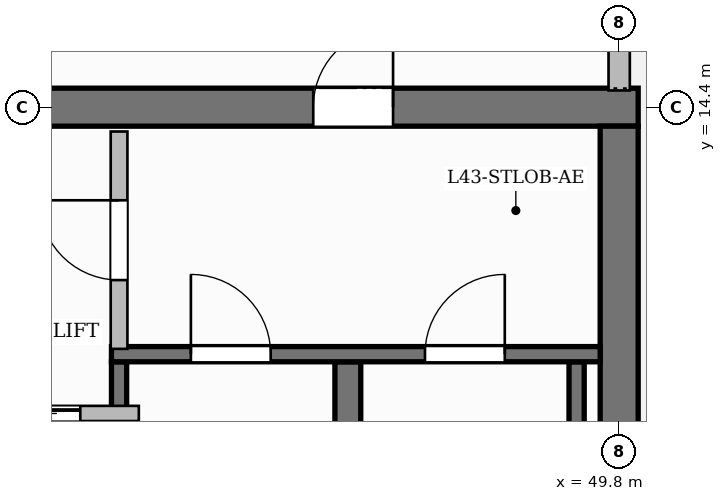
"""IFC4 building model, lengths in metres.
Left out: names, types, materials, properties, quantities, classifications, styles, units other than length and angle.
Written with IfcOpenShell. Run it as: python <this file> out.ifc"""

import sys

from ifc_helpers import new_model, si_unit, direction, frame, frame_2d, origin, place, context, subcontext, project, spatial, rectangle, extrude, source, transform, mapped, element, fill, save


model = new_model("IFC4")
c1 = context("Model", 3, precision=1e-05, world=origin(), true_north=direction((0.0, 1.0)))
c2 = subcontext(c1, "Body", "Model", "MODEL_VIEW")
j1 = project(units=[si_unit("LENGTHUNIT", "METRE"), si_unit("PLANEANGLEUNIT", "RADIAN")], contexts=[c1])
p1 = place(None, origin())
s1 = spatial("IfcSite", under=j1, at=p1, CompositionType="ELEMENT")
p2 = place(p1, origin())
s2 = spatial("IfcBuilding", under=s1, at=p2, CompositionType="ELEMENT")
p3 = place(p2, frame((0.0, 0.0, 173.4)))
s3 = spatial("IfcBuildingStorey", under=s2, at=p3, CompositionType="ELEMENT", Elevation=173.4)
p4 = place(p3, frame((34.55, 14.4, 0.0), z_axis=(0.0, 0.0, 1.0), x_axis=(1.0, 0.0, 0.0)))
e1 = element("IfcWall", 1, at=p4, inside=s3, PredefinedType="SHEAR", context=c2, shape_type="SweptSolid", body=[
    extrude(rectangle(XDim=15.5, YDim=0.5, at=frame_2d((7.75, 0.0))), origin(), (0.0, 0.0, 1.0), 3.85),
])
p5 = place(p4, frame((5.38, 0.0, 0.0)))
e2 = element("IfcOpeningElement", 2, at=p5, cuts=e1, PredefinedType="OPENING", context=c2, shape_type="SweptSolid", body=[
    extrude(rectangle(XDim=1.5, YDim=2.2, at=frame_2d((0.75, 1.1))), frame((0.0, 0.26, 0.0), z_axis=(0.0, -1.0, 0.0), x_axis=(1.0, 0.0, 0.0)), (0.0, 0.0, 1.0), 0.52),
])
p6 = place(p4, frame((1.595, 0.0, 0.0)))
e3 = element("IfcOpeningElement", 3, at=p6, cuts=e1, PredefinedType="OPENING", context=c2, shape_type="SweptSolid", body=[
    extrude(rectangle(XDim=1.05, YDim=2.15, at=frame_2d((0.525, 1.075))), frame((0.0, 0.26, 0.0), z_axis=(0.0, -1.0, 0.0), x_axis=(1.0, 0.0, 0.0)), (0.0, 0.0, 1.0), 0.52),
])
p7 = place(p4, frame((11.225, 0.0, 0.0)))
e4 = element("IfcOpeningElement", 4, at=p7, cuts=e1, PredefinedType="OPENING", context=c2, shape_type="SweptSolid", body=[
    extrude(rectangle(XDim=1.05, YDim=2.15, at=frame_2d((0.525, 1.075))), frame((0.0, 0.26, 0.0), z_axis=(0.0, -1.0, 0.0), x_axis=(1.0, 0.0, 0.0)), (0.0, 0.0, 1.0), 0.52),
])
p8 = place(p3, frame((49.8, 3.85, 0.0), z_axis=(0.0, 0.0, 1.0), x_axis=(0.0, 1.0, 0.0)))
e5 = element("IfcWall", 5, at=p8, inside=s3, PredefinedType="SHEAR", context=c2, shape_type="SweptSolid", body=[
    extrude(rectangle(XDim=10.3, YDim=0.5, at=frame_2d((5.15, 0.0))), origin(), (0.0, 0.0, 1.0), 3.85),
])
p9 = place(p3, frame((43.22, 4.1, 0.0), z_axis=(0.0, 0.0, 1.0), x_axis=(0.0, 1.0, 0.0)))
e6 = element("IfcWall", 6, at=p9, inside=s3, PredefinedType="SHEAR", context=c2, shape_type="SweptSolid", body=[
    extrude(rectangle(XDim=6.95, YDim=0.2, at=frame_2d((3.475, 0.0))), origin(), (0.0, 0.0, 1.0), 3.85),
])
p10 = place(p3, frame((46.23, 4.1, 0.0), z_axis=(0.0, 0.0, 1.0), x_axis=(0.0, 1.0, 0.0)))
e7 = element("IfcWall", 7, at=p10, inside=s3, PredefinedType="SHEAR", context=c2, shape_type="SweptSolid", body=[
    extrude(rectangle(XDim=6.95, YDim=0.34, at=frame_2d((3.475, 0.0))), origin(), (0.0, 0.0, 1.0), 3.85),
])
p11 = place(p3, frame((49.24, 4.1, 0.0), z_axis=(0.0, 0.0, 1.0), x_axis=(0.0, 1.0, 0.0)))
e8 = element("IfcWall", 8, at=p11, inside=s3, PredefinedType="SHEAR", context=c2, shape_type="SweptSolid", body=[
    extrude(rectangle(XDim=6.95, YDim=0.2, at=frame_2d((3.475, 0.0))), origin(), (0.0, 0.0, 1.0), 3.85),
])
p12 = place(p3, frame((43.12, 11.15, 0.0), z_axis=(0.0, 0.0, 1.0), x_axis=(1.0, 0.0, 0.0)))
e9 = element("IfcWall", 9, at=p12, inside=s3, PredefinedType="SHEAR", context=c2, shape_type="SweptSolid", body=[
    extrude(rectangle(XDim=6.43, YDim=0.2, at=frame_2d((3.215, 0.0))), origin(), (0.0, 0.0, 1.0), 3.85),
])
p13 = place(p12, frame((1.045, 0.0, 0.0)))
e10 = element("IfcOpeningElement", 10, at=p13, cuts=e9, PredefinedType="OPENING", context=c2, shape_type="SweptSolid", body=[
    extrude(rectangle(XDim=1.05, YDim=2.2, at=frame_2d((0.525, 1.1))), frame((0.0, 0.11, 0.0), z_axis=(0.0, -1.0, 0.0), x_axis=(1.0, 0.0, 0.0)), (0.0, 0.0, 1.0), 0.22),
])
p14 = place(p12, frame((4.125, 0.0, 0.0)))
e11 = element("IfcOpeningElement", 11, at=p14, cuts=e9, PredefinedType="OPENING", context=c2, shape_type="SweptSolid", body=[
    extrude(rectangle(XDim=1.05, YDim=2.2, at=frame_2d((0.525, 1.1))), frame((0.0, 0.11, 0.0), z_axis=(0.0, -1.0, 0.0), x_axis=(1.0, 0.0, 0.0)), (0.0, 0.0, 1.0), 0.22),
])
p15 = place(p3, frame((43.22, 11.22, 0.0), z_axis=(0.0, 0.0, 1.0), x_axis=(0.0, 1.0, 0.0)))
e12 = element("IfcWall", 12, at=p15, inside=s3, PredefinedType="PARTITIONING", context=c2, shape_type="SweptSolid", body=[
    extrude(rectangle(XDim=2.86, YDim=0.22, at=frame_2d((1.43, 0.0))), origin(), (0.0, 0.0, 1.0), 3.6),
])
p16 = place(p15, frame((0.905, 0.0, 0.0)))
e13 = element("IfcOpeningElement", 13, at=p16, cuts=e12, PredefinedType="OPENING", context=c2, shape_type="SweptSolid", body=[
    extrude(rectangle(XDim=1.05, YDim=2.15, at=frame_2d((0.525, 1.075))), frame((0.0, 0.12, 0.0), z_axis=(0.0, -1.0, 0.0), x_axis=(1.0, 0.0, 0.0)), (0.0, 0.0, 1.0), 0.24),
])
p17 = place(p3, frame((40.84, 10.37, 0.0), z_axis=(0.0, 0.0, 1.0), x_axis=(1.0, 0.0, 0.0)))
e14 = element("IfcWall", 14, at=p17, inside=s3, PredefinedType="PARTITIONING", context=c2, shape_type="SweptSolid", body=[
    extrude(rectangle(XDim=2.64, YDim=0.2, at=frame_2d((1.32, 0.0))), origin(), (0.0, 0.0, 1.0), 3.6),
])
p18 = place(p17, frame((0.77, 0.0, 0.0)))
e15 = element("IfcOpeningElement", 15, at=p18, cuts=e14, PredefinedType="OPENING", context=c2, shape_type="SweptSolid", body=[
    extrude(rectangle(XDim=1.1, YDim=2.2, at=frame_2d((0.55, 1.1))), frame((0.0, 0.11, 0.0), z_axis=(0.0, -1.0, 0.0), x_axis=(1.0, 0.0, 0.0)), (0.0, 0.0, 1.0), 0.22),
])
p19 = place(p3, frame((49.8, 14.62, 0.0), z_axis=(0.0, 0.0, 1.0), x_axis=(0.0, 1.0, 0.0)))
e16 = element("IfcWall", 16, at=p19, inside=s3, PredefinedType="SOLIDWALL", context=c2, shape_type="SweptSolid", body=[
    extrude(rectangle(XDim=6.93, YDim=0.28, at=frame_2d((3.465, 0.0))), origin(), (0.0, 0.0, 1.0), 3.085),
])
p20 = place(p19, frame((1.889, 0.0, 0.0)))
e17 = element("IfcOpeningElement", 17, at=p20, cuts=e16, PredefinedType="OPENING", context=c2, shape_type="SweptSolid", body=[
    extrude(rectangle(XDim=1.2, YDim=2.2, at=frame_2d((0.6, 1.1))), frame((0.0, 0.15, 0.0), z_axis=(0.0, -1.0, 0.0), x_axis=(1.0, 0.0, 0.0)), (0.0, 0.0, 1.0), 0.3),
])
p21 = place(p19, frame((3.884, 0.0, 0.8)))
e18 = element("IfcOpeningElement", 18, at=p21, cuts=e16, PredefinedType="OPENING", context=c2, shape_type="SweptSolid", body=[
    extrude(rectangle(XDim=1.8, YDim=1.85, at=frame_2d((0.9, 0.925))), frame((0.0, 0.15, 0.0), z_axis=(0.0, -1.0, 0.0), x_axis=(1.0, 0.0, 0.0)), (0.0, 0.0, 1.0), 0.3),
])
m1 = source(origin(), c2, "Body", "SweptSolid", [
    extrude(rectangle(XDim=1.05, YDim=2.2, at=frame_2d((0.525, 1.1))), frame((0.0, 0.025, 0.0), z_axis=(0.0, -1.0, 0.0), x_axis=(1.0, 0.0, 0.0)), (0.0, 0.0, 1.0), 0.05),
])
p22 = place(p13, origin())
e19 = element("IfcDoor", 19, at=p22, inside=s3, OperationType="SINGLE_SWING_LEFT", PredefinedType="DOOR", context=c2, shape_type="MappedRepresentation", body=[
    mapped(m1, transform((0.0, 0.0, 0.0), scale=1.0)),
])
fill(e10, e19)
p23 = place(p14, origin())
e20 = element("IfcDoor", 20, at=p23, inside=s3, OperationType="SINGLE_SWING_RIGHT", PredefinedType="DOOR", context=c2, shape_type="MappedRepresentation", body=[
    mapped(m1, transform((0.0, 0.0, 0.0), scale=1.0)),
])
fill(e11, e20)
m2 = source(origin(), c2, "Body", "SweptSolid", [
    extrude(rectangle(XDim=1.05, YDim=2.15, at=frame_2d((0.525, 1.075))), frame((0.0, 0.025, 0.0), z_axis=(0.0, -1.0, 0.0), x_axis=(1.0, 0.0, 0.0)), (0.0, 0.0, 1.0), 0.05),
])
p24 = place(p16, origin())
e21 = element("IfcDoor", 21, at=p24, inside=s3, OperationType="SINGLE_SWING_RIGHT", PredefinedType="DOOR", context=c2, shape_type="MappedRepresentation", body=[
    mapped(m2, transform((0.0, 0.0, 0.0), scale=1.0)),
])
fill(e13, e21)
p25 = place(p7, origin())
e22 = element("IfcDoor", 22, at=p25, inside=s3, OperationType="SINGLE_SWING_RIGHT", PredefinedType="DOOR", context=c2, shape_type="MappedRepresentation", body=[
    mapped(m2, transform((0.0, 0.0, 0.0), scale=1.0)),
])
fill(e4, e22)
m3 = source(origin(), c2, "Body", "SweptSolid", [
    extrude(rectangle(XDim=1.1, YDim=2.2, at=frame_2d((0.55, 1.1))), frame((0.0, 0.025, 0.0), z_axis=(0.0, -1.0, 0.0), x_axis=(1.0, 0.0, 0.0)), (0.0, 0.0, 1.0), 0.05),
])
p26 = place(p18, origin())
e23 = element("IfcDoor", 23, at=p26, inside=s3, OperationType="SLIDING_TO_LEFT", PredefinedType="DOOR", context=c2, shape_type="MappedRepresentation", body=[
    mapped(m3, transform((0.0, 0.0, 0.0), scale=1.0)),
])
fill(e15, e23)
save(model, sys.argv[1])
